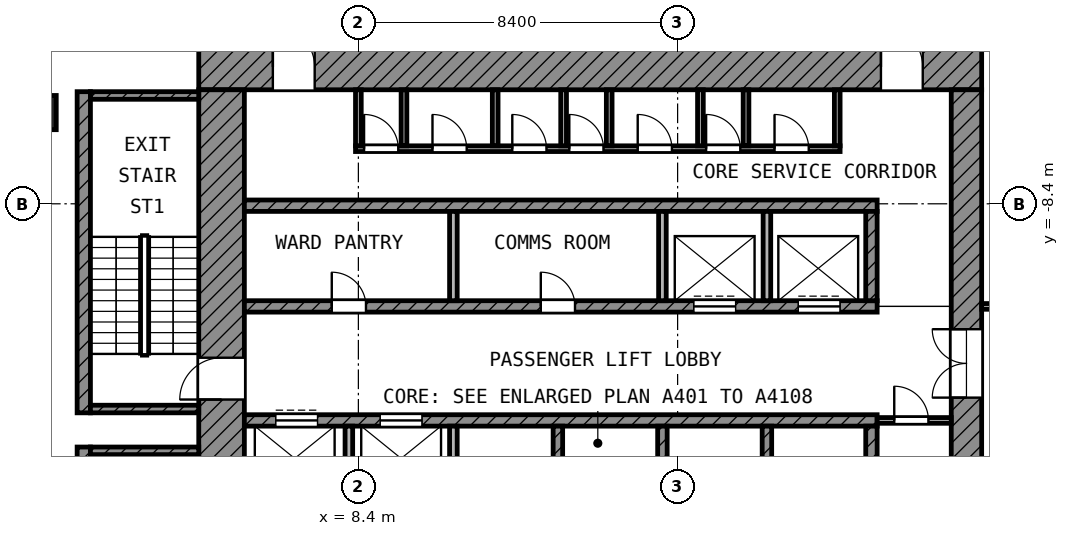
"""IFC4 building model, lengths in metres.
Left out: names, types, materials, properties, quantities, classifications, styles, units other than length and angle.
Written with IfcOpenShell. Run it as: python <this file> out.ifc"""

import sys

from ifc_helpers import new_model, si_unit, direction, frame, frame_2d, origin, origin_2d, place, context, subcontext, project, spatial, rectangle, extrude, element, fill, save


model = new_model("IFC4")
c1 = context("Model", 3, precision=1e-05, world=origin(), true_north=direction((0.0, 1.0)))
c2 = subcontext(c1, "Body", "Model", "MODEL_VIEW")
j1 = project(units=[si_unit("LENGTHUNIT", "METRE"), si_unit("PLANEANGLEUNIT", "RADIAN")], contexts=[c1])
p1 = place(None, origin())
s1 = spatial("IfcSite", under=j1, at=p1, CompositionType="ELEMENT")
p2 = place(p1, origin())
s2 = spatial("IfcBuilding", under=s1, at=p2, CompositionType="ELEMENT")
p3 = place(p2, frame((0.0, 0.0, 218.0)))
s3 = spatial("IfcBuildingStorey", under=s2, at=p3, CompositionType="ELEMENT", Elevation=218.0)
p4 = place(p3, frame((0.0, -6.0, 0.0), z_axis=(0.0, 0.0, 1.0), x_axis=(1.0, 0.0, 0.0)))
e1 = element("IfcColumn", 1, at=p4, inside=s3, PredefinedType="COLUMN", context=c2, shape_type="SweptSolid", body=[
    extrude(rectangle(XDim=0.9, YDim=0.9, at=origin_2d()), origin(), (0.0, 0.0, 1.0), 4.2),
])
p5 = place(p3, frame((4.2, -4.8, 0.0), z_axis=(0.0, 0.0, 1.0), x_axis=(1.0, 0.0, 0.0)))
e2 = element("IfcWall", 2, at=p5, inside=s3, PredefinedType="SHEAR", context=c2, shape_type="SweptSolid", body=[
    extrude(rectangle(XDim=20.6, YDim=1.2, at=frame_2d((10.3, 0.0))), origin(), (0.0, 0.0, 1.0), 3.6),
])
p6 = place(p5, frame((1.95, 0.0, 0.0)))
e3 = element("IfcOpeningElement", 3, at=p6, cuts=e2, PredefinedType="OPENING", context=c2, shape_type="SweptSolid", body=[
    extrude(rectangle(XDim=1.1, YDim=2.1, at=frame_2d((0.55, 1.05))), frame((0.0, 0.61, 0.0), z_axis=(0.0, -1.0, 0.0), x_axis=(1.0, 0.0, 0.0)), (0.0, 0.0, 1.0), 1.22),
])
p7 = place(p5, frame((17.95, 0.0, 0.0)))
e4 = element("IfcOpeningElement", 4, at=p7, cuts=e2, PredefinedType="OPENING", context=c2, shape_type="SweptSolid", body=[
    extrude(rectangle(XDim=1.1, YDim=2.1, at=frame_2d((0.55, 1.05))), frame((0.0, 0.61, 0.0), z_axis=(0.0, -1.0, 0.0), x_axis=(1.0, 0.0, 0.0)), (0.0, 0.0, 1.0), 1.22),
])
p8 = place(p3, frame((4.8, -24.8, 0.0), z_axis=(0.0, 0.0, 1.0), x_axis=(0.0, 1.0, 0.0)))
e5 = element("IfcWall", 5, at=p8, inside=s3, PredefinedType="SHEAR", context=c2, shape_type="SweptSolid", body=[
    extrude(rectangle(XDim=19.4, YDim=1.2, at=frame_2d((9.7, 0.0))), origin(), (0.0, 0.0, 1.0), 3.6),
])
p9 = place(p8, frame((11.25, 0.0, 0.0)))
e6 = element("IfcOpeningElement", 6, at=p9, cuts=e5, PredefinedType="OPENING", context=c2, shape_type="SweptSolid", body=[
    extrude(rectangle(XDim=1.1, YDim=2.1, at=frame_2d((0.55, 1.05))), frame((0.0, 0.61, 0.0), z_axis=(0.0, -1.0, 0.0), x_axis=(1.0, 0.0, 0.0)), (0.0, 0.0, 1.0), 1.22),
])
p10 = place(p8, frame((1.95, 0.0, 0.0)))
e7 = element("IfcOpeningElement", 7, at=p10, cuts=e5, PredefinedType="OPENING", context=c2, shape_type="SweptSolid", body=[
    extrude(rectangle(XDim=1.1, YDim=2.1, at=frame_2d((0.55, 1.05))), frame((0.0, 0.61, 0.0), z_axis=(0.0, -1.0, 0.0), x_axis=(1.0, 0.0, 0.0)), (0.0, 0.0, 1.0), 1.22),
])
p11 = place(p3, frame((24.4, -24.0, 0.0), z_axis=(0.0, 0.0, 1.0), x_axis=(0.0, 1.0, 0.0)))
e8 = element("IfcWall", 8, at=p11, inside=s3, PredefinedType="SHEAR", context=c2, shape_type="SweptSolid", body=[
    extrude(rectangle(XDim=18.6, YDim=0.8, at=frame_2d((9.3, 0.0))), origin(), (0.0, 0.0, 1.0), 3.6),
])
p12 = place(p11, frame((10.5, 0.0, 0.0)))
e9 = element("IfcOpeningElement", 9, at=p12, cuts=e8, PredefinedType="OPENING", context=c2, shape_type="SweptSolid", body=[
    extrude(rectangle(XDim=1.8, YDim=2.1, at=frame_2d((0.9, 1.05))), frame((0.0, 0.41, 0.0), z_axis=(0.0, -1.0, 0.0), x_axis=(1.0, 0.0, 0.0)), (0.0, 0.0, 1.0), 0.82),
])
p13 = place(p3, frame((5.4, -8.45, 0.0), z_axis=(0.0, 0.0, 1.0), x_axis=(1.0, 0.0, 0.0)))
e10 = element("IfcWall", 10, at=p13, inside=s3, PredefinedType="SHEAR", context=c2, shape_type="SweptSolid", body=[
    extrude(rectangle(XDim=16.65, YDim=0.3, at=frame_2d((8.325, 0.0))), origin(), (0.0, 0.0, 1.0), 3.6),
])
p14 = place(p3, frame((5.4, -11.1, 0.0), z_axis=(0.0, 0.0, 1.0), x_axis=(1.0, 0.0, 0.0)))
e11 = element("IfcWall", 11, at=p14, inside=s3, PredefinedType="SHEAR", context=c2, shape_type="SweptSolid", body=[
    extrude(rectangle(XDim=16.65, YDim=0.3, at=frame_2d((8.325, 0.0))), origin(), (0.0, 0.0, 1.0), 3.6),
])
p15 = place(p14, frame((11.825, 0.0, 0.0)))
e12 = element("IfcOpeningElement", 12, at=p15, cuts=e11, PredefinedType="OPENING", context=c2, shape_type="SweptSolid", body=[
    extrude(rectangle(XDim=1.1, YDim=2.1, at=frame_2d((0.55, 1.05))), frame((0.0, 0.16, 0.0), z_axis=(0.0, -1.0, 0.0), x_axis=(1.0, 0.0, 0.0)), (0.0, 0.0, 1.0), 0.32),
])
p16 = place(p14, frame((14.575, 0.0, 0.0)))
e13 = element("IfcOpeningElement", 13, at=p16, cuts=e11, PredefinedType="OPENING", context=c2, shape_type="SweptSolid", body=[
    extrude(rectangle(XDim=1.1, YDim=2.1, at=frame_2d((0.55, 1.05))), frame((0.0, 0.16, 0.0), z_axis=(0.0, -1.0, 0.0), x_axis=(1.0, 0.0, 0.0)), (0.0, 0.0, 1.0), 0.32),
])
p17 = place(p14, frame((2.3, 0.0, 0.0)))
e14 = element("IfcOpeningElement", 14, at=p17, cuts=e11, PredefinedType="OPENING", context=c2, shape_type="SweptSolid", body=[
    extrude(rectangle(XDim=0.9, YDim=2.1, at=frame_2d((0.45, 1.05))), frame((0.0, 0.16, 0.0), z_axis=(0.0, -1.0, 0.0), x_axis=(1.0, 0.0, 0.0)), (0.0, 0.0, 1.0), 0.32),
])
p18 = place(p14, frame((7.8, 0.0, 0.0)))
e15 = element("IfcOpeningElement", 15, at=p18, cuts=e11, PredefinedType="OPENING", context=c2, shape_type="SweptSolid", body=[
    extrude(rectangle(XDim=0.9, YDim=2.1, at=frame_2d((0.45, 1.05))), frame((0.0, 0.16, 0.0), z_axis=(0.0, -1.0, 0.0), x_axis=(1.0, 0.0, 0.0)), (0.0, 0.0, 1.0), 0.32),
])
p19 = place(p3, frame((5.4, -14.1, 0.0), z_axis=(0.0, 0.0, 1.0), x_axis=(1.0, 0.0, 0.0)))
e16 = element("IfcWall", 16, at=p19, inside=s3, PredefinedType="SHEAR", context=c2, shape_type="SweptSolid", body=[
    extrude(rectangle(XDim=16.65, YDim=0.3, at=frame_2d((8.325, 0.0))), origin(), (0.0, 0.0, 1.0), 3.6),
])
p20 = place(p19, frame((0.825, 0.0, 0.0)))
e17 = element("IfcOpeningElement", 17, at=p20, cuts=e16, PredefinedType="OPENING", context=c2, shape_type="SweptSolid", body=[
    extrude(rectangle(XDim=1.1, YDim=2.1, at=frame_2d((0.55, 1.05))), frame((0.0, 0.16, 0.0), z_axis=(0.0, -1.0, 0.0), x_axis=(1.0, 0.0, 0.0)), (0.0, 0.0, 1.0), 0.32),
])
p21 = place(p19, frame((3.575, 0.0, 0.0)))
e18 = element("IfcOpeningElement", 18, at=p21, cuts=e16, PredefinedType="OPENING", context=c2, shape_type="SweptSolid", body=[
    extrude(rectangle(XDim=1.1, YDim=2.1, at=frame_2d((0.55, 1.05))), frame((0.0, 0.16, 0.0), z_axis=(0.0, -1.0, 0.0), x_axis=(1.0, 0.0, 0.0)), (0.0, 0.0, 1.0), 0.32),
])
p22 = place(p3, frame((21.9, -10.95, 0.0), z_axis=(0.0, 0.0, 1.0), x_axis=(0.0, 1.0, 0.0)))
e19 = element("IfcWall", 19, at=p22, inside=s3, PredefinedType="SHEAR", context=c2, shape_type="SweptSolid", body=[
    extrude(rectangle(XDim=2.35, YDim=0.3, at=frame_2d((1.175, 0.0))), origin(), (0.0, 0.0, 1.0), 3.6),
])
p23 = place(p3, frame((21.9, -16.6, 0.0), z_axis=(0.0, 0.0, 1.0), x_axis=(0.0, 1.0, 0.0)))
e20 = element("IfcWall", 20, at=p23, inside=s3, PredefinedType="SHEAR", context=c2, shape_type="SweptSolid", body=[
    extrude(rectangle(XDim=2.35, YDim=0.3, at=frame_2d((1.175, 0.0))), origin(), (0.0, 0.0, 1.0), 3.6),
])
for number, where, z_axis, x_axis in (
    (21, (10.9, -10.95, 0.0), (0.0, 0.0, 1.0), (0.0, 1.0, 0.0)),
    (22, (16.4, -10.95, 0.0), (0.0, 0.0, 1.0), (0.0, 1.0, 0.0)),
    (23, (19.15, -10.95, 0.0), (0.0, 0.0, 1.0), (0.0, 1.0, 0.0)),
):
    element("IfcWall", number, at=place(p3, frame(where, z_axis=z_axis, x_axis=x_axis)), inside=s3, PredefinedType="PARTITIONING", context=c2, shape_type="SweptSolid", body=[
        extrude(rectangle(XDim=2.35, YDim=0.2, at=frame_2d((1.175, 0.0))), origin(), (0.0, 0.0, 1.0), 3.6),
    ])
for number, where, z_axis, x_axis in (
    (24, (8.15, -16.6, 0.0), (0.0, 0.0, 1.0), (0.0, 1.0, 0.0)),
    (25, (10.9, -16.6, 0.0), (0.0, 0.0, 1.0), (0.0, 1.0, 0.0)),
):
    element("IfcWall", number, at=place(p3, frame(where, z_axis=z_axis, x_axis=x_axis)), inside=s3, PredefinedType="PARTITIONING", context=c2, shape_type="SweptSolid", body=[
        extrude(rectangle(XDim=2.35, YDim=0.2, at=frame_2d((1.175, 0.0))), origin(), (0.0, 0.0, 1.0), 3.6),
    ])
for number, where, z_axis, x_axis in (
    (26, (13.65, -16.6, 0.0), (0.0, 0.0, 1.0), (0.0, 1.0, 0.0)),
    (27, (16.4, -16.6, 0.0), (0.0, 0.0, 1.0), (0.0, 1.0, 0.0)),
    (28, (19.15, -16.6, 0.0), (0.0, 0.0, 1.0), (0.0, 1.0, 0.0)),
):
    element("IfcWall", number, at=place(p3, frame(where, z_axis=z_axis, x_axis=x_axis)), inside=s3, PredefinedType="SHEAR", context=c2, shape_type="SweptSolid", body=[
        extrude(rectangle(XDim=2.35, YDim=0.25, at=frame_2d((1.175, 0.0))), origin(), (0.0, 0.0, 1.0), 3.6),
    ])
p24 = place(p3, frame((22.05, -14.1, 0.0), z_axis=(0.0, 0.0, 1.0), x_axis=(1.0, 0.0, 0.0)))
e29 = element("IfcWall", 29, at=p24, inside=s3, PredefinedType="PARTITIONING", context=c2, shape_type="SweptSolid", body=[
    extrude(rectangle(XDim=1.95, YDim=0.15, at=frame_2d((0.975, 0.0))), origin(), (0.0, 0.0, 1.0), 3.6),
])
p25 = place(p24, frame((0.45, 0.0, 0.0)))
e30 = element("IfcOpeningElement", 30, at=p25, cuts=e29, PredefinedType="OPENING", context=c2, shape_type="SweptSolid", body=[
    extrude(rectangle(XDim=0.9, YDim=2.1, at=frame_2d((0.45, 1.05))), frame((0.0, 0.085, 0.0), z_axis=(0.0, -1.0, 0.0), x_axis=(1.0, 0.0, 0.0)), (0.0, 0.0, 1.0), 0.17),
])
p26 = place(p3, frame((8.325, -6.95, 0.0), z_axis=(0.0, 0.0, 1.0), x_axis=(1.0, 0.0, 0.0)))
e31 = element("IfcWall", 31, at=p26, inside=s3, PredefinedType="PARTITIONING", context=c2, shape_type="SweptSolid", body=[
    extrude(rectangle(XDim=12.75, YDim=0.15, at=frame_2d((6.375, 0.0))), origin(), (0.0, 0.0, 1.0), 3.6),
])
p27 = place(p26, frame((0.225, 0.0, 0.0)))
e32 = element("IfcOpeningElement", 32, at=p27, cuts=e31, PredefinedType="OPENING", context=c2, shape_type="SweptSolid", body=[
    extrude(rectangle(XDim=0.9, YDim=2.1, at=frame_2d((0.45, 1.05))), frame((0.0, 0.085, 0.0), z_axis=(0.0, -1.0, 0.0), x_axis=(1.0, 0.0, 0.0)), (0.0, 0.0, 1.0), 0.17),
])
p28 = place(p26, frame((2.025, 0.0, 0.0)))
e33 = element("IfcOpeningElement", 33, at=p28, cuts=e31, PredefinedType="OPENING", context=c2, shape_type="SweptSolid", body=[
    extrude(rectangle(XDim=0.9, YDim=2.1, at=frame_2d((0.45, 1.05))), frame((0.0, 0.085, 0.0), z_axis=(0.0, -1.0, 0.0), x_axis=(1.0, 0.0, 0.0)), (0.0, 0.0, 1.0), 0.17),
])
p29 = place(p26, frame((4.125, 0.0, 0.0)))
e34 = element("IfcOpeningElement", 34, at=p29, cuts=e31, PredefinedType="OPENING", context=c2, shape_type="SweptSolid", body=[
    extrude(rectangle(XDim=0.9, YDim=2.1, at=frame_2d((0.45, 1.05))), frame((0.0, 0.085, 0.0), z_axis=(0.0, -1.0, 0.0), x_axis=(1.0, 0.0, 0.0)), (0.0, 0.0, 1.0), 0.17),
])
p30 = place(p26, frame((5.625, 0.0, 0.0)))
e35 = element("IfcOpeningElement", 35, at=p30, cuts=e31, PredefinedType="OPENING", context=c2, shape_type="SweptSolid", body=[
    extrude(rectangle(XDim=0.9, YDim=2.1, at=frame_2d((0.45, 1.05))), frame((0.0, 0.085, 0.0), z_axis=(0.0, -1.0, 0.0), x_axis=(1.0, 0.0, 0.0)), (0.0, 0.0, 1.0), 0.17),
])
p31 = place(p26, frame((7.425, 0.0, 0.0)))
e36 = element("IfcOpeningElement", 36, at=p31, cuts=e31, PredefinedType="OPENING", context=c2, shape_type="SweptSolid", body=[
    extrude(rectangle(XDim=0.9, YDim=2.1, at=frame_2d((0.45, 1.05))), frame((0.0, 0.085, 0.0), z_axis=(0.0, -1.0, 0.0), x_axis=(1.0, 0.0, 0.0)), (0.0, 0.0, 1.0), 0.17),
])
p32 = place(p26, frame((9.225, 0.0, 0.0)))
e37 = element("IfcOpeningElement", 37, at=p32, cuts=e31, PredefinedType="OPENING", context=c2, shape_type="SweptSolid", body=[
    extrude(rectangle(XDim=0.9, YDim=2.1, at=frame_2d((0.45, 1.05))), frame((0.0, 0.085, 0.0), z_axis=(0.0, -1.0, 0.0), x_axis=(1.0, 0.0, 0.0)), (0.0, 0.0, 1.0), 0.17),
])
p33 = place(p26, frame((11.025, 0.0, 0.0)))
e38 = element("IfcOpeningElement", 38, at=p33, cuts=e31, PredefinedType="OPENING", context=c2, shape_type="SweptSolid", body=[
    extrude(rectangle(XDim=0.9, YDim=2.1, at=frame_2d((0.45, 1.05))), frame((0.0, 0.085, 0.0), z_axis=(0.0, -1.0, 0.0), x_axis=(1.0, 0.0, 0.0)), (0.0, 0.0, 1.0), 0.17),
])
for number, where, z_axis, x_axis in (
    (39, (8.4, -6.875, 0.0), (0.0, 0.0, 1.0), (0.0, 1.0, 0.0)),
    (40, (9.6, -6.875, 0.0), (0.0, 0.0, 1.0), (0.0, 1.0, 0.0)),
    (41, (12.0, -6.875, 0.0), (0.0, 0.0, 1.0), (0.0, 1.0, 0.0)),
    (42, (13.8, -6.875, 0.0), (0.0, 0.0, 1.0), (0.0, 1.0, 0.0)),
    (43, (15.0, -6.875, 0.0), (0.0, 0.0, 1.0), (0.0, 1.0, 0.0)),
    (44, (17.4, -6.875, 0.0), (0.0, 0.0, 1.0), (0.0, 1.0, 0.0)),
    (45, (18.6, -6.875, 0.0), (0.0, 0.0, 1.0), (0.0, 1.0, 0.0)),
    (46, (21.0, -6.875, 0.0), (0.0, 0.0, 1.0), (0.0, 1.0, 0.0)),
):
    element("IfcWall", number, at=place(p3, frame(where, z_axis=z_axis, x_axis=x_axis)), inside=s3, PredefinedType="PARTITIONING", context=c2, shape_type="SweptSolid", body=[
        extrude(rectangle(XDim=1.475, YDim=0.15, at=frame_2d((0.738, 0.0))), origin(), (0.0, 0.0, 1.0), 3.6),
    ])
p34 = place(p3, frame((1.175, -13.9, 0.0), z_axis=(0.0, 0.0, 1.0), x_axis=(0.0, 1.0, 0.0)))
e47 = element("IfcWall", 47, at=p34, inside=s3, PredefinedType="SHEAR", context=c2, shape_type="SweptSolid", body=[
    extrude(rectangle(XDim=8.45, YDim=0.35, at=frame_2d((4.225, 0.0))), origin(), (0.0, 0.0, 1.0), 3.6),
])
for number, where, z_axis, x_axis in (
    (48, (1.35, -5.55, 0.0), (0.0, 0.0, 1.0), (1.0, 0.0, 0.0)),
    (49, (1.35, -13.8, 0.0), (0.0, 0.0, 1.0), (1.0, 0.0, 0.0)),
):
    element("IfcWall", number, at=place(p3, frame(where, z_axis=z_axis, x_axis=x_axis)), inside=s3, PredefinedType="SHEAR", context=c2, shape_type="SweptSolid", body=[
        extrude(rectangle(XDim=2.85, YDim=0.2, at=frame_2d((1.425, 0.0))), origin(), (0.0, 0.0, 1.0), 3.6),
    ])
p35 = place(p3, frame((1.175, -23.25, 0.0), z_axis=(0.0, 0.0, 1.0), x_axis=(0.0, 1.0, 0.0)))
e50 = element("IfcWall", 50, at=p35, inside=s3, PredefinedType="SHEAR", context=c2, shape_type="SweptSolid", body=[
    extrude(rectangle(XDim=8.45, YDim=0.35, at=frame_2d((4.225, 0.0))), origin(), (0.0, 0.0, 1.0), 3.6),
])
p36 = place(p3, frame((1.35, -14.9, 0.0), z_axis=(0.0, 0.0, 1.0), x_axis=(1.0, 0.0, 0.0)))
e51 = element("IfcWall", 51, at=p36, inside=s3, PredefinedType="SHEAR", context=c2, shape_type="SweptSolid", body=[
    extrude(rectangle(XDim=2.85, YDim=0.2, at=frame_2d((1.425, 0.0))), origin(), (0.0, 0.0, 1.0), 3.6),
])
p37 = place(p3, frame((24.8, -11.1, 0.0), z_axis=(0.0, 0.0, 1.0), x_axis=(1.0, 0.0, 0.0)))
e52 = element("IfcWall", 52, at=p37, inside=s3, PredefinedType="PARTITIONING", context=c2, shape_type="SweptSolid", body=[
    extrude(rectangle(XDim=4.525, YDim=0.15, at=frame_2d((2.262, 0.0))), origin(), (0.0, 0.0, 1.0), 3.6),
])
p38 = place(p37, frame((1.0, 0.0, 0.0)))
e53 = element("IfcOpeningElement", 53, at=p38, cuts=e52, PredefinedType="OPENING", context=c2, shape_type="SweptSolid", body=[
    extrude(rectangle(XDim=0.9, YDim=2.1, at=frame_2d((0.45, 1.05))), frame((0.0, 0.085, 0.0), z_axis=(0.0, -1.0, 0.0), x_axis=(1.0, 0.0, 0.0)), (0.0, 0.0, 1.0), 0.17),
])
p39 = place(p37, frame((3.05, 0.0, 0.0)))
e54 = element("IfcOpeningElement", 54, at=p39, cuts=e52, PredefinedType="OPENING", context=c2, shape_type="SweptSolid", body=[
    extrude(rectangle(XDim=1.0, YDim=2.1, at=frame_2d((0.5, 1.05))), frame((0.0, 0.085, 0.0), z_axis=(0.0, -1.0, 0.0), x_axis=(1.0, 0.0, 0.0)), (0.0, 0.0, 1.0), 0.17),
])
p40 = place(p15, origin())
e55 = element("IfcDoor", 55, at=p40, inside=s3, OperationType="DOUBLE_DOOR_SLIDING", PredefinedType="DOOR", context=c2, shape_type="SweptSolid", body=[
    extrude(rectangle(XDim=1.1, YDim=2.1, at=frame_2d((0.55, 1.05))), frame((0.0, 0.025, 0.0), z_axis=(0.0, -1.0, 0.0), x_axis=(1.0, 0.0, 0.0)), (0.0, 0.0, 1.0), 0.05),
])
fill(e12, e55)
p41 = place(p16, origin())
e56 = element("IfcDoor", 56, at=p41, inside=s3, OperationType="DOUBLE_DOOR_SLIDING", PredefinedType="DOOR", context=c2, shape_type="SweptSolid", body=[
    extrude(rectangle(XDim=1.1, YDim=2.1, at=frame_2d((0.55, 1.05))), frame((0.0, 0.025, 0.0), z_axis=(0.0, -1.0, 0.0), x_axis=(1.0, 0.0, 0.0)), (0.0, 0.0, 1.0), 0.05),
])
fill(e13, e56)
p42 = place(p20, origin())
e57 = element("IfcDoor", 57, at=p42, inside=s3, OperationType="DOUBLE_DOOR_SLIDING", PredefinedType="DOOR", context=c2, shape_type="SweptSolid", body=[
    extrude(rectangle(XDim=1.1, YDim=2.1, at=frame_2d((0.55, 1.05))), frame((0.0, 0.025, 0.0), z_axis=(0.0, -1.0, 0.0), x_axis=(1.0, 0.0, 0.0)), (0.0, 0.0, 1.0), 0.05),
])
fill(e17, e57)
p43 = place(p21, origin())
e58 = element("IfcDoor", 58, at=p43, inside=s3, OperationType="DOUBLE_DOOR_SLIDING", PredefinedType="DOOR", context=c2, shape_type="SweptSolid", body=[
    extrude(rectangle(XDim=1.1, YDim=2.1, at=frame_2d((0.55, 1.05))), frame((0.0, 0.025, 0.0), z_axis=(0.0, -1.0, 0.0), x_axis=(1.0, 0.0, 0.0)), (0.0, 0.0, 1.0), 0.05),
])
fill(e18, e58)
p44 = place(p9, origin())
e59 = element("IfcDoor", 59, at=p44, inside=s3, OperationType="SINGLE_SWING_LEFT", PredefinedType="DOOR", context=c2, shape_type="SweptSolid", body=[
    extrude(rectangle(XDim=1.1, YDim=2.1, at=frame_2d((0.55, 1.05))), frame((0.0, 0.025, 0.0), z_axis=(0.0, -1.0, 0.0), x_axis=(1.0, 0.0, 0.0)), (0.0, 0.0, 1.0), 0.05),
])
fill(e6, e59)
p45 = place(p6, origin())
e60 = element("IfcDoor", 60, at=p45, inside=s3, OperationType="SINGLE_SWING_LEFT", PredefinedType="DOOR", context=c2, shape_type="SweptSolid", body=[
    extrude(rectangle(XDim=1.1, YDim=2.1, at=frame_2d((0.55, 1.05))), frame((0.0, 0.025, 0.0), z_axis=(0.0, -1.0, 0.0), x_axis=(1.0, 0.0, 0.0)), (0.0, 0.0, 1.0), 0.05),
])
fill(e3, e60)
p46 = place(p7, origin())
e61 = element("IfcDoor", 61, at=p46, inside=s3, OperationType="SINGLE_SWING_LEFT", PredefinedType="DOOR", context=c2, shape_type="SweptSolid", body=[
    extrude(rectangle(XDim=1.1, YDim=2.1, at=frame_2d((0.55, 1.05))), frame((0.0, 0.025, 0.0), z_axis=(0.0, -1.0, 0.0), x_axis=(1.0, 0.0, 0.0)), (0.0, 0.0, 1.0), 0.05),
])
fill(e4, e61)
p47 = place(p12, origin())
e62 = element("IfcDoor", 62, at=p47, inside=s3, OperationType="DOUBLE_DOOR_SINGLE_SWING", PredefinedType="DOOR", context=c2, shape_type="SweptSolid", body=[
    extrude(rectangle(XDim=1.8, YDim=2.1, at=frame_2d((0.9, 1.05))), frame((0.0, 0.025, 0.0), z_axis=(0.0, -1.0, 0.0), x_axis=(1.0, 0.0, 0.0)), (0.0, 0.0, 1.0), 0.05),
])
fill(e9, e62)
p48 = place(p27, origin())
e63 = element("IfcDoor", 63, at=p48, inside=s3, OperationType="SINGLE_SWING_LEFT", PredefinedType="DOOR", context=c2, shape_type="SweptSolid", body=[
    extrude(rectangle(XDim=0.9, YDim=2.1, at=frame_2d((0.45, 1.05))), frame((0.0, 0.025, 0.0), z_axis=(0.0, -1.0, 0.0), x_axis=(1.0, 0.0, 0.0)), (0.0, 0.0, 1.0), 0.05),
])
fill(e32, e63)
p49 = place(p28, origin())
e64 = element("IfcDoor", 64, at=p49, inside=s3, OperationType="SINGLE_SWING_LEFT", PredefinedType="DOOR", context=c2, shape_type="SweptSolid", body=[
    extrude(rectangle(XDim=0.9, YDim=2.1, at=frame_2d((0.45, 1.05))), frame((0.0, 0.025, 0.0), z_axis=(0.0, -1.0, 0.0), x_axis=(1.0, 0.0, 0.0)), (0.0, 0.0, 1.0), 0.05),
])
fill(e33, e64)
p50 = place(p29, origin())
e65 = element("IfcDoor", 65, at=p50, inside=s3, OperationType="SINGLE_SWING_LEFT", PredefinedType="DOOR", context=c2, shape_type="SweptSolid", body=[
    extrude(rectangle(XDim=0.9, YDim=2.1, at=frame_2d((0.45, 1.05))), frame((0.0, 0.025, 0.0), z_axis=(0.0, -1.0, 0.0), x_axis=(1.0, 0.0, 0.0)), (0.0, 0.0, 1.0), 0.05),
])
fill(e34, e65)
p51 = place(p30, origin())
e66 = element("IfcDoor", 66, at=p51, inside=s3, OperationType="SINGLE_SWING_LEFT", PredefinedType="DOOR", context=c2, shape_type="SweptSolid", body=[
    extrude(rectangle(XDim=0.9, YDim=2.1, at=frame_2d((0.45, 1.05))), frame((0.0, 0.025, 0.0), z_axis=(0.0, -1.0, 0.0), x_axis=(1.0, 0.0, 0.0)), (0.0, 0.0, 1.0), 0.05),
])
fill(e35, e66)
p52 = place(p31, origin())
e67 = element("IfcDoor", 67, at=p52, inside=s3, OperationType="SINGLE_SWING_LEFT", PredefinedType="DOOR", context=c2, shape_type="SweptSolid", body=[
    extrude(rectangle(XDim=0.9, YDim=2.1, at=frame_2d((0.45, 1.05))), frame((0.0, 0.025, 0.0), z_axis=(0.0, -1.0, 0.0), x_axis=(1.0, 0.0, 0.0)), (0.0, 0.0, 1.0), 0.05),
])
fill(e36, e67)
p53 = place(p32, origin())
e68 = element("IfcDoor", 68, at=p53, inside=s3, OperationType="SINGLE_SWING_LEFT", PredefinedType="DOOR", context=c2, shape_type="SweptSolid", body=[
    extrude(rectangle(XDim=0.9, YDim=2.1, at=frame_2d((0.45, 1.05))), frame((0.0, 0.025, 0.0), z_axis=(0.0, -1.0, 0.0), x_axis=(1.0, 0.0, 0.0)), (0.0, 0.0, 1.0), 0.05),
])
fill(e37, e68)
p54 = place(p33, origin())
e69 = element("IfcDoor", 69, at=p54, inside=s3, OperationType="SINGLE_SWING_LEFT", PredefinedType="DOOR", context=c2, shape_type="SweptSolid", body=[
    extrude(rectangle(XDim=0.9, YDim=2.1, at=frame_2d((0.45, 1.05))), frame((0.0, 0.025, 0.0), z_axis=(0.0, -1.0, 0.0), x_axis=(1.0, 0.0, 0.0)), (0.0, 0.0, 1.0), 0.05),
])
fill(e38, e69)
p55 = place(p25, origin())
e70 = element("IfcDoor", 70, at=p55, inside=s3, OperationType="SINGLE_SWING_LEFT", PredefinedType="DOOR", context=c2, shape_type="SweptSolid", body=[
    extrude(rectangle(XDim=0.9, YDim=2.1, at=frame_2d((0.45, 1.05))), frame((0.0, 0.025, 0.0), z_axis=(0.0, -1.0, 0.0), x_axis=(1.0, 0.0, 0.0)), (0.0, 0.0, 1.0), 0.05),
])
fill(e30, e70)
p56 = place(p17, origin())
e71 = element("IfcDoor", 71, at=p56, inside=s3, OperationType="SINGLE_SWING_LEFT", PredefinedType="DOOR", context=c2, shape_type="SweptSolid", body=[
    extrude(rectangle(XDim=0.9, YDim=2.1, at=frame_2d((0.45, 1.05))), frame((0.0, 0.025, 0.0), z_axis=(0.0, -1.0, 0.0), x_axis=(1.0, 0.0, 0.0)), (0.0, 0.0, 1.0), 0.05),
])
fill(e14, e71)
p57 = place(p18, origin())
e72 = element("IfcDoor", 72, at=p57, inside=s3, OperationType="SINGLE_SWING_LEFT", PredefinedType="DOOR", context=c2, shape_type="SweptSolid", body=[
    extrude(rectangle(XDim=0.9, YDim=2.1, at=frame_2d((0.45, 1.05))), frame((0.0, 0.025, 0.0), z_axis=(0.0, -1.0, 0.0), x_axis=(1.0, 0.0, 0.0)), (0.0, 0.0, 1.0), 0.05),
])
fill(e15, e72)
save(model, sys.argv[1])
